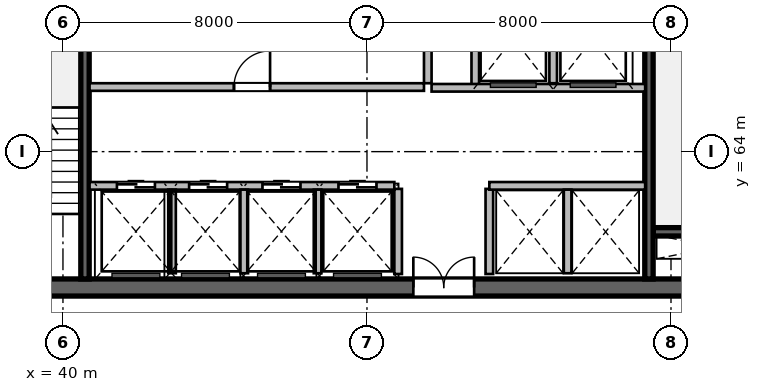
"""IFC4 building model, lengths in metres.
Left out: names, types, materials, properties, quantities, classifications, styles, units other than length and angle.
Written with IfcOpenShell. Run it as: python <this file> out.ifc"""

import sys

from ifc_helpers import new_model, si_unit, direction, frame, frame_2d, origin, place, context, subcontext, project, spatial, rectangle, extrude, source, transform, mapped, element, fill, save


model = new_model("IFC4")
c1 = context("Model", 3, precision=1e-05, world=origin(), true_north=direction((0.0, 1.0)))
c2 = subcontext(c1, "Body", "Model", "MODEL_VIEW")
j1 = project(units=[si_unit("LENGTHUNIT", "METRE"), si_unit("PLANEANGLEUNIT", "RADIAN")], contexts=[c1])
p1 = place(None, origin())
s1 = spatial("IfcSite", under=j1, at=p1, CompositionType="ELEMENT")
p2 = place(p1, origin())
s2 = spatial("IfcBuilding", under=s1, at=p2, CompositionType="ELEMENT")
p3 = place(p2, frame((0.0, 0.0, 211.8)))
s3 = spatial("IfcBuildingStorey", under=s2, at=p3, CompositionType="ELEMENT", Elevation=211.8)
m1 = source(origin(), c2, "Body", "SweptSolid", [
    extrude(rectangle(XDim=21.6, YDim=0.45, at=frame_2d((10.8, 0.0))), origin(), (0.0, 0.0, 1.0), 3.9),
])
p4 = place(p3, frame((37.2, 60.425, 0.0), z_axis=(0.0, 0.0, 1.0), x_axis=(1.0, 0.0, 0.0)))
e1 = element("IfcWall", 1, at=p4, inside=s3, PredefinedType="SHEAR", context=c2, shape_type="MappedRepresentation", body=[
    mapped(m1, transform((0.0, 0.0, 0.0), scale=1.0)),
])
p5 = place(p4, frame((1.1, 0.0, 0.0)))
e2 = element("IfcOpeningElement", 2, at=p5, cuts=e1, PredefinedType="OPENING", context=c2, shape_type="SweptSolid", body=[
    extrude(rectangle(XDim=1.15, YDim=2.15, at=frame_2d((0.575, 1.075))), frame((0.0, 0.235, 0.0), z_axis=(0.0, -1.0, 0.0), x_axis=(1.0, 0.0, 0.0)), (0.0, 0.0, 1.0), 0.47),
])
p6 = place(p4, frame((19.5, 0.0, 0.0)))
e3 = element("IfcOpeningElement", 3, at=p6, cuts=e1, PredefinedType="OPENING", context=c2, shape_type="SweptSolid", body=[
    extrude(rectangle(XDim=0.9, YDim=2.1, at=frame_2d((0.45, 1.05))), frame((0.0, 0.235, 0.0), z_axis=(0.0, -1.0, 0.0), x_axis=(1.0, 0.0, 0.0)), (0.0, 0.0, 1.0), 0.47),
])
p7 = place(p4, frame((12.02, 0.0, 0.0)))
e4 = element("IfcOpeningElement", 4, at=p7, cuts=e1, PredefinedType="OPENING", context=c2, shape_type="SweptSolid", body=[
    extrude(rectangle(XDim=1.6, YDim=2.15, at=frame_2d((0.8, 1.075))), frame((0.0, 0.235, 0.0), z_axis=(0.0, -1.0, 0.0), x_axis=(1.0, 0.0, 0.0)), (0.0, 0.0, 1.0), 0.47),
])
m2 = source(origin(), c2, "Body", "SweptSolid", [
    extrude(rectangle(XDim=3.27, YDim=0.22, at=frame_2d((1.635, 0.0))), origin(), (0.0, 0.0, 1.0), 3.9),
])
p8 = place(p3, frame((55.53, 61.89, 0.0), z_axis=(0.0, 0.0, 1.0), x_axis=(1.0, 0.0, 0.0)))
e5 = element("IfcWall", 5, at=p8, inside=s3, PredefinedType="SHEAR", context=c2, shape_type="MappedRepresentation", body=[
    mapped(m2, transform((0.0, 0.0, 0.0), scale=1.0)),
])
m3 = source(origin(), c2, "Body", "SweptSolid", [
    extrude(rectangle(XDim=11.1, YDim=0.22, at=frame_2d((5.55, 0.0))), origin(), (0.0, 0.0, 1.0), 3.9),
])
p9 = place(p3, frame((40.58, 60.65, 0.0), z_axis=(0.0, 0.0, 1.0), x_axis=(0.0, 1.0, 0.0)))
e6 = element("IfcWall", 6, at=p9, inside=s3, PredefinedType="SHEAR", context=c2, shape_type="MappedRepresentation", body=[
    mapped(m3, transform((0.0, 0.0, 0.0), scale=1.0)),
])
p10 = place(p3, frame((55.42, 60.65, 0.0), z_axis=(0.0, 0.0, 1.0), x_axis=(0.0, 1.0, 0.0)))
e7 = element("IfcWall", 7, at=p10, inside=s3, PredefinedType="SHEAR", context=c2, shape_type="MappedRepresentation", body=[
    mapped(m3, transform((0.0, 0.0, 0.0), scale=1.0)),
])
p11 = place(p10, frame((9.595, 0.0, 0.0)))
e8 = element("IfcOpeningElement", 8, at=p11, cuts=e7, PredefinedType="OPENING", context=c2, shape_type="SweptSolid", body=[
    extrude(rectangle(XDim=1.15, YDim=2.15, at=frame_2d((0.575, 1.075))), frame((0.0, 0.12, 0.0), z_axis=(0.0, -1.0, 0.0), x_axis=(1.0, 0.0, 0.0)), (0.0, 0.0, 1.0), 0.24),
])
m4 = source(origin(), c2, "Body", "SweptSolid", [
    extrude(rectangle(XDim=2.24, YDim=0.2, at=frame_2d((1.12, 0.0))), origin(), (0.0, 0.0, 1.0), 3.64),
])
for number, where, z_axis, x_axis in (
    (9, (48.82, 60.78, 0.0), (0.0, 0.0, 1.0), (0.0, 1.0, 0.0)),
    (10, (51.22, 60.78, 0.0), (0.0, 0.0, 1.0), (0.0, 1.0, 0.0)),
):
    element("IfcWall", number, at=place(p3, frame(where, z_axis=z_axis, x_axis=x_axis)), inside=s3, PredefinedType="SOLIDWALL", context=c2, shape_type="MappedRepresentation", body=[
        mapped(m4, transform((0.0, 0.0, 0.0), scale=1.0)),
    ])
m5 = source(origin(), c2, "Body", "SweptSolid", [
    extrude(rectangle(XDim=5.8, YDim=0.2, at=frame_2d((2.9, 0.0))), origin(), (0.0, 0.0, 1.0), 3.64),
])
p12 = place(p3, frame((49.6, 65.8, 0.0), z_axis=(0.0, 0.0, 1.0), x_axis=(0.0, 1.0, 0.0)))
e11 = element("IfcWall", 11, at=p12, inside=s3, PredefinedType="SOLIDWALL", context=c2, shape_type="MappedRepresentation", body=[
    mapped(m5, transform((0.0, 0.0, 0.0), scale=1.0)),
])
m6 = source(origin(), c2, "Body", "SweptSolid", [
    extrude(rectangle(XDim=2.58, YDim=0.2, at=frame_2d((1.29, 0.0))), origin(), (0.0, 0.0, 1.0), 3.64),
])
p13 = place(p3, frame((50.85, 65.68, 0.0), z_axis=(0.0, 0.0, 1.0), x_axis=(0.0, 1.0, 0.0)))
e12 = element("IfcWall", 12, at=p13, inside=s3, PredefinedType="SOLIDWALL", context=c2, shape_type="MappedRepresentation", body=[
    mapped(m6, transform((0.0, 0.0, 0.0), scale=1.0)),
])
m7 = source(origin(), c2, "Body", "SweptSolid", [
    extrude(rectangle(XDim=2.4, YDim=0.2, at=frame_2d((1.2, 0.0))), origin(), (0.0, 0.0, 1.0), 3.64),
])
p14 = place(p3, frame((52.9, 65.8, 0.0), z_axis=(0.0, 0.0, 1.0), x_axis=(0.0, 1.0, 0.0)))
e13 = element("IfcWall", 13, at=p14, inside=s3, PredefinedType="SOLIDWALL", context=c2, shape_type="MappedRepresentation", body=[
    mapped(m7, transform((0.0, 0.0, 0.0), scale=1.0)),
])
m8 = source(origin(), c2, "Body", "SweptSolid", [
    extrude(rectangle(XDim=5.62, YDim=0.2, at=frame_2d((2.81, 0.0))), origin(), (0.0, 0.0, 1.0), 3.64),
])
p15 = place(p3, frame((49.7, 65.68, 0.0), z_axis=(0.0, 0.0, 1.0), x_axis=(1.0, 0.0, 0.0)))
e14 = element("IfcWall", 14, at=p15, inside=s3, PredefinedType="SOLIDWALL", context=c2, shape_type="MappedRepresentation", body=[
    mapped(m8, transform((0.0, 0.0, 0.0), scale=1.0)),
])
m9 = source(origin(), c2, "Body", "SweptSolid", [
    extrude(rectangle(XDim=8.02, YDim=0.2, at=frame_2d((4.01, 0.0))), origin(), (0.0, 0.0, 1.0), 3.64),
])
p16 = place(p3, frame((40.7, 63.1, 0.0), z_axis=(0.0, 0.0, 1.0), x_axis=(1.0, 0.0, 0.0)))
e15 = element("IfcWall", 15, at=p16, inside=s3, PredefinedType="SOLIDWALL", context=c2, shape_type="MappedRepresentation", body=[
    mapped(m9, transform((0.0, 0.0, 0.0), scale=1.0)),
])
p17 = place(p16, frame((0.72, 0.0, 0.0)))
e16 = element("IfcOpeningElement", 16, at=p17, cuts=e15, PredefinedType="OPENING", context=c2, shape_type="SweptSolid", body=[
    extrude(rectangle(XDim=1.0, YDim=2.15, at=frame_2d((0.5, 1.075))), frame((0.0, 0.11, 0.0), z_axis=(0.0, -1.0, 0.0), x_axis=(1.0, 0.0, 0.0)), (0.0, 0.0, 1.0), 0.22),
])
p18 = place(p16, frame((2.62, 0.0, 0.0)))
e17 = element("IfcOpeningElement", 17, at=p18, cuts=e15, PredefinedType="OPENING", context=c2, shape_type="SweptSolid", body=[
    extrude(rectangle(XDim=1.0, YDim=2.15, at=frame_2d((0.5, 1.075))), frame((0.0, 0.11, 0.0), z_axis=(0.0, -1.0, 0.0), x_axis=(1.0, 0.0, 0.0)), (0.0, 0.0, 1.0), 0.22),
])
p19 = place(p16, frame((4.55, 0.0, 0.0)))
e18 = element("IfcOpeningElement", 18, at=p19, cuts=e15, PredefinedType="OPENING", context=c2, shape_type="SweptSolid", body=[
    extrude(rectangle(XDim=1.0, YDim=2.15, at=frame_2d((0.5, 1.075))), frame((0.0, 0.11, 0.0), z_axis=(0.0, -1.0, 0.0), x_axis=(1.0, 0.0, 0.0)), (0.0, 0.0, 1.0), 0.22),
])
p20 = place(p16, frame((6.55, 0.0, 0.0)))
e19 = element("IfcOpeningElement", 19, at=p20, cuts=e15, PredefinedType="OPENING", context=c2, shape_type="SweptSolid", body=[
    extrude(rectangle(XDim=1.0, YDim=2.15, at=frame_2d((0.5, 1.075))), frame((0.0, 0.11, 0.0), z_axis=(0.0, -1.0, 0.0), x_axis=(1.0, 0.0, 0.0)), (0.0, 0.0, 1.0), 0.22),
])
m10 = source(origin(), c2, "Body", "SweptSolid", [
    extrude(rectangle(XDim=4.1, YDim=0.2, at=frame_2d((2.05, 0.0))), origin(), (0.0, 0.0, 1.0), 3.64),
])
p21 = place(p3, frame((51.22, 63.1, 0.0), z_axis=(0.0, 0.0, 1.0), x_axis=(1.0, 0.0, 0.0)))
e20 = element("IfcWall", 20, at=p21, inside=s3, PredefinedType="SOLIDWALL", context=c2, shape_type="MappedRepresentation", body=[
    mapped(m10, transform((0.0, 0.0, 0.0), scale=1.0)),
])
m11 = source(origin(), c2, "Body", "SweptSolid", [
    extrude(rectangle(XDim=2.2, YDim=0.2, at=frame_2d((1.1, 0.0))), origin(), (0.0, 0.0, 1.0), 3.64),
])
for number, where, z_axis, x_axis in (
    (21, (42.87, 60.8, 0.0), (0.0, 0.0, 1.0), (0.0, 1.0, 0.0)),
    (22, (44.77, 60.8, 0.0), (0.0, 0.0, 1.0), (0.0, 1.0, 0.0)),
    (23, (46.7, 60.8, 0.0), (0.0, 0.0, 1.0), (0.0, 1.0, 0.0)),
    (24, (53.28, 60.8, 0.0), (0.0, 0.0, 1.0), (0.0, 1.0, 0.0)),
):
    element("IfcWall", number, at=place(p3, frame(where, z_axis=z_axis, x_axis=x_axis)), inside=s3, PredefinedType="SOLIDWALL", context=c2, shape_type="MappedRepresentation", body=[
        mapped(m11, transform((0.0, 0.0, 0.0), scale=1.0)),
    ])
m12 = source(origin(), c2, "Body", "SweptSolid", [
    extrude(rectangle(XDim=8.8, YDim=0.2, at=frame_2d((4.4, 0.0))), origin(), (0.0, 0.0, 1.0), 3.64),
])
p22 = place(p3, frame((40.7, 65.7, 0.0), z_axis=(0.0, 0.0, 1.0), x_axis=(1.0, 0.0, 0.0)))
e25 = element("IfcWall", 25, at=p22, inside=s3, PredefinedType="SOLIDWALL", context=c2, shape_type="MappedRepresentation", body=[
    mapped(m12, transform((0.0, 0.0, 0.0), scale=1.0)),
])
p23 = place(p22, frame((3.8, 0.0, 0.0)))
e26 = element("IfcOpeningElement", 26, at=p23, cuts=e25, PredefinedType="OPENING", context=c2, shape_type="SweptSolid", body=[
    extrude(rectangle(XDim=0.95, YDim=2.15, at=frame_2d((0.475, 1.075))), frame((0.0, 0.11, 0.0), z_axis=(0.0, -1.0, 0.0), x_axis=(1.0, 0.0, 0.0)), (0.0, 0.0, 1.0), 0.22),
])
m13 = source(origin(), c2, "Body", "SweptSolid", [
    extrude(rectangle(XDim=1.6, YDim=2.15, at=frame_2d((0.8, 1.075))), frame((0.0, 0.025, 0.0), z_axis=(0.0, -1.0, 0.0), x_axis=(1.0, 0.0, 0.0)), (0.0, 0.0, 1.0), 0.05),
])
p24 = place(p7, origin())
e27 = element("IfcDoor", 27, at=p24, inside=s3, OperationType="DOUBLE_DOOR_SINGLE_SWING", PredefinedType="DOOR", context=c2, shape_type="MappedRepresentation", body=[
    mapped(m13, transform((0.0, 0.0, 0.0), scale=1.0)),
])
fill(e4, e27)
m14 = source(origin(), c2, "Body", "SweptSolid", [
    extrude(rectangle(XDim=1.0, YDim=2.15, at=frame_2d((0.5, 1.075))), frame((0.0, 0.025, 0.0), z_axis=(0.0, -1.0, 0.0), x_axis=(1.0, 0.0, 0.0)), (0.0, 0.0, 1.0), 0.05),
])
p25 = place(p17, origin())
e28 = element("IfcDoor", 28, at=p25, inside=s3, OperationType="DOUBLE_DOOR_SLIDING", PredefinedType="DOOR", context=c2, shape_type="MappedRepresentation", body=[
    mapped(m14, transform((0.0, 0.0, 0.0), scale=1.0)),
])
fill(e16, e28)
p26 = place(p18, origin())
e29 = element("IfcDoor", 29, at=p26, inside=s3, OperationType="DOUBLE_DOOR_SLIDING", PredefinedType="DOOR", context=c2, shape_type="MappedRepresentation", body=[
    mapped(m14, transform((0.0, 0.0, 0.0), scale=1.0)),
])
fill(e17, e29)
p27 = place(p19, origin())
e30 = element("IfcDoor", 30, at=p27, inside=s3, OperationType="DOUBLE_DOOR_SLIDING", PredefinedType="DOOR", context=c2, shape_type="MappedRepresentation", body=[
    mapped(m14, transform((0.0, 0.0, 0.0), scale=1.0)),
])
fill(e18, e30)
p28 = place(p20, origin())
e31 = element("IfcDoor", 31, at=p28, inside=s3, OperationType="DOUBLE_DOOR_SLIDING", PredefinedType="DOOR", context=c2, shape_type="MappedRepresentation", body=[
    mapped(m14, transform((0.0, 0.0, 0.0), scale=1.0)),
])
fill(e19, e31)
m15 = source(origin(), c2, "Body", "SweptSolid", [
    extrude(rectangle(XDim=0.95, YDim=2.15, at=frame_2d((0.475, 1.075))), frame((0.0, 0.025, 0.0), z_axis=(0.0, -1.0, 0.0), x_axis=(1.0, 0.0, 0.0)), (0.0, 0.0, 1.0), 0.05),
])
p29 = place(p23, origin())
e32 = element("IfcDoor", 32, at=p29, inside=s3, OperationType="SINGLE_SWING_RIGHT", PredefinedType="DOOR", context=c2, shape_type="MappedRepresentation", body=[
    mapped(m15, transform((0.0, 0.0, 0.0), scale=1.0)),
])
fill(e26, e32)
save(model, sys.argv[1])
